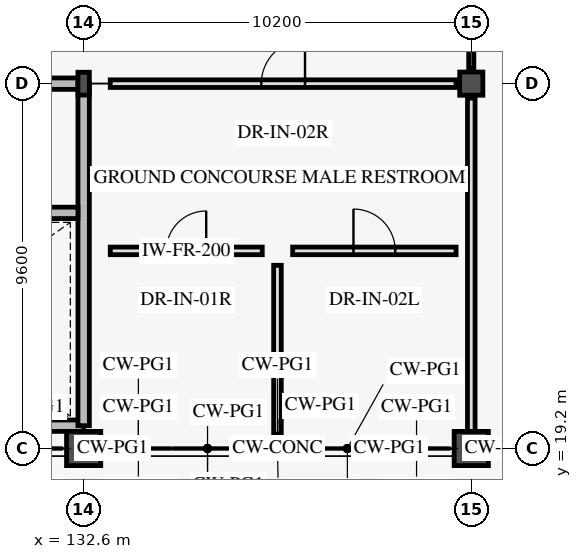
"""IFC4 building model, lengths in metres.
Left out: names, types, materials, properties, quantities, classifications, styles, units other than length and angle.
Written with IfcOpenShell. Run it as: python <this file> out.ifc"""

import sys

from ifc_helpers import new_model, si_unit, direction, frame, frame_2d, origin, origin_2d, place, context, subcontext, project, spatial, rectangle, hollow_circle, i_section, extrude, element, fill, save


model = new_model("IFC4")
c1 = context("Model", 3, precision=1e-05, world=origin(), true_north=direction((0.0, 1.0)))
c2 = subcontext(c1, "Body", "Model", "MODEL_VIEW")
j1 = project(units=[si_unit("LENGTHUNIT", "METRE"), si_unit("PLANEANGLEUNIT", "RADIAN")], contexts=[c1])
p1 = place(None, origin())
s1 = spatial("IfcSite", under=j1, at=p1, CompositionType="ELEMENT")
p2 = place(p1, origin())
s2 = spatial("IfcBuilding", under=s1, at=p2, CompositionType="ELEMENT")
p3 = place(p2, origin())
s3 = spatial("IfcBuildingStorey", under=s2, at=p3, CompositionType="ELEMENT", Elevation=0.0)
p4 = place(p3, frame((132.6, 19.2, 0.0), z_axis=(0.0, 0.0, 1.0), x_axis=(1.0, 0.0, 0.0)))
e1 = element("IfcColumn", 1, at=p4, inside=s3, PredefinedType="COLUMN", context=c2, shape_type="SweptSolid", body=[
    extrude(rectangle(XDim=0.9, YDim=0.9, at=origin_2d()), origin(), (0.0, 0.0, 1.0), 5.4),
])
p5 = place(p3, frame((132.6, 28.8, 0.0), z_axis=(0.0, 0.0, 1.0), x_axis=(1.0, 0.0, 0.0)))
e2 = element("IfcColumn", 2, at=p5, inside=s3, PredefinedType="COLUMN", context=c2, shape_type="SweptSolid", body=[
    extrude(i_section(OverallWidth=0.3, OverallDepth=0.6, WebThickness=0.015, FlangeThickness=0.03, FilletRadius=0.027, at=origin_2d()), origin(), (0.0, 0.0, 1.0), 5.4),
])
p6 = place(p3, frame((142.8, 19.2, 0.0), z_axis=(0.0, 0.0, 1.0), x_axis=(1.0, 0.0, 0.0)))
e3 = element("IfcColumn", 3, at=p6, inside=s3, PredefinedType="COLUMN", context=c2, shape_type="SweptSolid", body=[
    extrude(rectangle(XDim=0.9, YDim=0.9, at=origin_2d()), origin(), (0.0, 0.0, 1.0), 5.4),
])
p7 = place(p3, frame((142.8, 28.8, 0.0), z_axis=(0.0, 0.0, 1.0), x_axis=(1.0, 0.0, 0.0)))
e4 = element("IfcColumn", 4, at=p7, inside=s3, PredefinedType="COLUMN", context=c2, shape_type="SweptSolid", body=[
    extrude(hollow_circle(Radius=0.305, WallThickness=0.025, at=origin_2d()), origin(), (0.0, 0.0, 1.0), 5.4),
])
for number, where, z_axis, x_axis in (
    (5, (122.4, 19.8, 0.0), (0.0, 0.0, 1.0), (1.0, 0.0, 0.0)),
    (6, (122.4, 28.8, 0.0), (0.0, 0.0, 1.0), (1.0, 0.0, 0.0)),
):
    element("IfcWall", number, at=place(p3, frame(where, z_axis=z_axis, x_axis=x_axis)), inside=s3, PredefinedType="SHEAR", context=c2, shape_type="SweptSolid", body=[
        extrude(rectangle(XDim=10.2, YDim=0.3, at=frame_2d((5.1, 0.0))), origin(), (0.0, 0.0, 1.0), 5.4),
    ])
p8 = place(p3, frame((132.6, 19.8, 0.0), z_axis=(0.0, 0.0, 1.0), x_axis=(0.0, 1.0, 0.0)))
e7 = element("IfcWall", 7, at=p8, inside=s3, PredefinedType="SHEAR", context=c2, shape_type="SweptSolid", body=[
    extrude(rectangle(XDim=9.0, YDim=0.3, at=frame_2d((4.5, 0.0))), origin(), (0.0, 0.0, 1.0), 5.4),
])
p9 = place(p3, frame((143.04, 19.2, 0.0), z_axis=(0.0, 0.0, 1.0), x_axis=(1.0, 0.0, 0.0)))
e8 = element("IfcWall", 8, at=p9, inside=s3, PredefinedType="STANDARD", context=c2, shape_type="SweptSolid", body=[
    extrude(rectangle(XDim=9.72, YDim=0.28, at=frame_2d((4.86, 0.0))), origin(), (0.0, 0.0, 1.0), 3.68),
])
p10 = place(p9, frame((1.027, 0.0, 0.0)))
e9 = element("IfcOpeningElement", 9, at=p10, cuts=e8, PredefinedType="OPENING", context=c2, shape_type="SweptSolid", body=[
    extrude(rectangle(XDim=3.0, YDim=2.5, at=frame_2d((1.5, 1.25))), frame((0.0, 0.15, 0.0), z_axis=(0.0, -1.0, 0.0), x_axis=(1.0, 0.0, 0.0)), (0.0, 0.0, 1.0), 0.3),
])
p11 = place(p9, frame((5.198, 0.0, 0.85)))
e10 = element("IfcOpeningElement", 10, at=p11, cuts=e8, PredefinedType="OPENING", context=c2, shape_type="SweptSolid", body=[
    extrude(rectangle(XDim=3.6, YDim=2.1, at=frame_2d((1.8, 1.05))), frame((0.0, 0.15, 0.0), z_axis=(0.0, -1.0, 0.0), x_axis=(1.0, 0.0, 0.0)), (0.0, 0.0, 1.0), 0.3),
])
p12 = place(p3, frame((122.55, 25.4, 0.0), z_axis=(0.0, 0.0, 1.0), x_axis=(1.0, 0.0, 0.0)))
e11 = element("IfcWall", 11, at=p12, inside=s3, PredefinedType="SHEAR", context=c2, shape_type="SweptSolid", body=[
    extrude(rectangle(XDim=9.9, YDim=0.3, at=frame_2d((4.95, 0.0))), origin(), (0.0, 0.0, 1.0), 5.4),
])
p13 = place(p3, frame((142.8, 29.2, 0.0), z_axis=(0.0, 0.0, 1.0), x_axis=(0.0, 1.0, 0.0)))
e12 = element("IfcWall", 12, at=p13, inside=s3, PredefinedType="PARTITIONING", context=c2, shape_type="SweptSolid", body=[
    extrude(rectangle(XDim=11.0, YDim=0.135, at=frame_2d((5.5, 0.0))), origin(), (0.0, 0.0, 1.0), 4.08),
])
p14 = place(p13, frame((4.7, 0.0, 0.0)))
e13 = element("IfcOpeningElement", 13, at=p14, cuts=e12, PredefinedType="OPENING", context=c2, shape_type="SweptSolid", body=[
    extrude(rectangle(XDim=1.6, YDim=2.2, at=frame_2d((0.8, 1.1))), frame((0.0, 0.077, 0.0), z_axis=(0.0, -1.0, 0.0), x_axis=(1.0, 0.0, 0.0)), (0.0, 0.0, 1.0), 0.155),
])
p15 = place(p3, frame((133.3, 24.4, 0.0), z_axis=(0.0, 0.0, 1.0), x_axis=(1.0, 0.0, 0.0)))
e14 = element("IfcWall", 14, at=p15, inside=s3, PredefinedType="PARTITIONING", context=c2, shape_type="SweptSolid", body=[
    extrude(rectangle(XDim=4.0, YDim=0.2, at=frame_2d((2.0, 0.0))), origin(), (0.0, 0.0, 1.0), 4.08),
])
p16 = place(p15, frame((1.475, 0.0, 0.0)))
e15 = element("IfcOpeningElement", 15, at=p16, cuts=e14, PredefinedType="OPENING", context=c2, shape_type="SweptSolid", body=[
    extrude(rectangle(XDim=1.05, YDim=2.15, at=frame_2d((0.525, 1.075))), frame((0.0, 0.11, 0.0), z_axis=(0.0, -1.0, 0.0), x_axis=(1.0, 0.0, 0.0)), (0.0, 0.0, 1.0), 0.22),
])
p17 = place(p3, frame((138.1, 24.4, 0.0), z_axis=(0.0, 0.0, 1.0), x_axis=(1.0, 0.0, 0.0)))
e16 = element("IfcWall", 16, at=p17, inside=s3, PredefinedType="PARTITIONING", context=c2, shape_type="SweptSolid", body=[
    extrude(rectangle(XDim=4.3, YDim=0.2, at=frame_2d((2.15, 0.0))), origin(), (0.0, 0.0, 1.0), 4.08),
])
p18 = place(p17, frame((1.6, 0.0, 0.0)))
e17 = element("IfcOpeningElement", 17, at=p18, cuts=e16, PredefinedType="OPENING", context=c2, shape_type="SweptSolid", body=[
    extrude(rectangle(XDim=1.1, YDim=2.2, at=frame_2d((0.55, 1.1))), frame((0.0, 0.11, 0.0), z_axis=(0.0, -1.0, 0.0), x_axis=(1.0, 0.0, 0.0)), (0.0, 0.0, 1.0), 0.22),
])
p19 = place(p3, frame((133.3, 28.8, 0.0), z_axis=(0.0, 0.0, 1.0), x_axis=(1.0, 0.0, 0.0)))
e18 = element("IfcWall", 18, at=p19, inside=s3, PredefinedType="PARTITIONING", context=c2, shape_type="SweptSolid", body=[
    extrude(rectangle(XDim=9.1, YDim=0.2, at=frame_2d((4.55, 0.0))), origin(), (0.0, 0.0, 1.0), 4.08),
])
p20 = place(p19, frame((3.975, 0.0, 0.0)))
e19 = element("IfcOpeningElement", 19, at=p20, cuts=e18, PredefinedType="OPENING", context=c2, shape_type="SweptSolid", body=[
    extrude(rectangle(XDim=1.15, YDim=2.2, at=frame_2d((0.575, 1.1))), frame((0.0, 0.11, 0.0), z_axis=(0.0, -1.0, 0.0), x_axis=(1.0, 0.0, 0.0)), (0.0, 0.0, 1.0), 0.22),
])
p21 = place(p3, frame((142.8, 19.58, 0.0), z_axis=(0.0, 0.0, 1.0), x_axis=(0.0, 1.0, 0.0)))
e20 = element("IfcWall", 20, at=p21, inside=s3, PredefinedType="PARTITIONING", context=c2, shape_type="SweptSolid", body=[
    extrude(rectangle(XDim=8.84, YDim=0.2, at=frame_2d((4.42, 0.0))), origin(), (0.0, 0.0, 1.0), 4.08),
])
p22 = place(p3, frame((137.7, 19.58, 0.0), z_axis=(0.0, 0.0, 1.0), x_axis=(0.0, 1.0, 0.0)))
e21 = element("IfcWall", 21, at=p22, inside=s3, PredefinedType="PARTITIONING", context=c2, shape_type="SweptSolid", body=[
    extrude(rectangle(XDim=4.44, YDim=0.2, at=frame_2d((2.22, 0.0))), origin(), (0.0, 0.0, 1.0), 4.08),
])
p23 = place(p16, origin())
e22 = element("IfcDoor", 22, at=p23, inside=s3, OperationType="SINGLE_SWING_RIGHT", PredefinedType="DOOR", context=c2, shape_type="SweptSolid", body=[
    extrude(rectangle(XDim=1.05, YDim=2.15, at=frame_2d((0.525, 1.075))), frame((0.0, 0.025, 0.0), z_axis=(0.0, -1.0, 0.0), x_axis=(1.0, 0.0, 0.0)), (0.0, 0.0, 1.0), 0.05),
])
fill(e15, e22)
p24 = place(p18, origin())
e23 = element("IfcDoor", 23, at=p24, inside=s3, OperationType="SINGLE_SWING_LEFT", PredefinedType="DOOR", context=c2, shape_type="SweptSolid", body=[
    extrude(rectangle(XDim=1.1, YDim=2.2, at=frame_2d((0.55, 1.1))), frame((0.0, 0.025, 0.0), z_axis=(0.0, -1.0, 0.0), x_axis=(1.0, 0.0, 0.0)), (0.0, 0.0, 1.0), 0.05),
])
fill(e17, e23)
p25 = place(p20, origin())
e24 = element("IfcDoor", 24, at=p25, inside=s3, OperationType="SINGLE_SWING_RIGHT", PredefinedType="DOOR", context=c2, shape_type="SweptSolid", body=[
    extrude(rectangle(XDim=1.15, YDim=2.2, at=frame_2d((0.575, 1.1))), frame((0.0, 0.025, 0.0), z_axis=(0.0, -1.0, 0.0), x_axis=(1.0, 0.0, 0.0)), (0.0, 0.0, 1.0), 0.05),
])
fill(e19, e24)
save(model, sys.argv[1])
